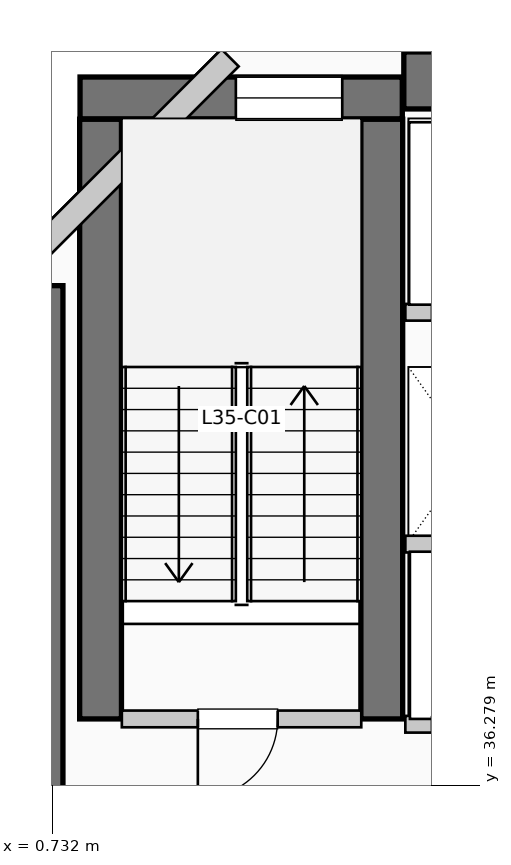
"""IFC4 building model, lengths in metres.
Left out: names, types, materials, properties, quantities, classifications, styles, units other than length and angle.
Written with IfcOpenShell. Run it as: python <this file> out.ifc"""

import sys

from ifc_helpers import new_model, si_unit, direction, frame, frame_2d, origin, place, context, subcontext, project, spatial, rectangle, extrude, element, fill, save


model = new_model("IFC4")
c1 = context("Model", 3, precision=1e-05, world=origin(), true_north=direction((0.0, 1.0)))
c2 = subcontext(c1, "Body", "Model", "MODEL_VIEW")
j1 = project(units=[si_unit("LENGTHUNIT", "METRE"), si_unit("PLANEANGLEUNIT", "RADIAN")], contexts=[c1])
p1 = place(None, origin())
s1 = spatial("IfcSite", under=j1, at=p1, CompositionType="ELEMENT")
p2 = place(p1, origin())
s2 = spatial("IfcBuilding", under=s1, at=p2, CompositionType="ELEMENT")
p3 = place(p2, frame((0.0, 0.0, 146.85)))
s3 = spatial("IfcBuildingStorey", under=s2, at=p3, CompositionType="ELEMENT", Elevation=146.85)
p4 = place(p3, frame((5.36, 45.55, 0.0), z_axis=(0.0, 0.0, 1.0), x_axis=(1.0, 0.0, 0.0)))
e1 = element("IfcWall", 1, at=p4, inside=s3, PredefinedType="SHEAR", context=c2, shape_type="SweptSolid", body=[
    extrude(rectangle(XDim=13.98, YDim=0.75, at=frame_2d((6.99, 0.0))), origin(), (0.0, 0.0, 1.0), 3.96),
])
p5 = place(p3, frame((0.5, 34.95, 0.0), z_axis=(0.0, 0.0, 1.0), x_axis=(0.0, 1.0, 0.0)))
e2 = element("IfcWall", 2, at=p5, inside=s3, PredefinedType="SHEAR", context=c2, shape_type="SweptSolid", body=[
    extrude(rectangle(XDim=7.9, YDim=0.75, at=frame_2d((3.95, 0.0))), origin(), (0.0, 0.0, 1.0), 3.96),
])
for number, where, z_axis, x_axis in (
    (3, (1.37, 37.15, 0.0), (0.0, 0.0, 1.0), (0.0, 1.0, 0.0)),
    (4, (5.07, 37.15, 0.0), (0.0, 0.0, 1.0), (0.0, 1.0, 0.0)),
):
    element("IfcWall", number, at=place(p3, frame(where, z_axis=z_axis, x_axis=x_axis)), inside=s3, PredefinedType="SHEAR", context=c2, shape_type="SweptSolid", body=[
        extrude(rectangle(XDim=7.89, YDim=0.55, at=frame_2d((3.945, 0.0))), origin(), (0.0, 0.0, 1.0), 3.96),
    ])
p6 = place(p3, frame((1.1, 45.32, 0.0), z_axis=(0.0, 0.0, 1.0), x_axis=(1.0, 0.0, 0.0)))
e5 = element("IfcWall", 5, at=p6, inside=s3, PredefinedType="SHEAR", context=c2, shape_type="SweptSolid", body=[
    extrude(rectangle(XDim=4.24, YDim=0.55, at=frame_2d((2.12, 0.0))), origin(), (0.0, 0.0, 1.0), 3.96),
])
p7 = place(p6, frame((2.05, 0.0, 1.05)))
e6 = element("IfcOpeningElement", 6, at=p7, cuts=e5, PredefinedType="OPENING", context=c2, shape_type="SweptSolid", body=[
    extrude(rectangle(XDim=1.4, YDim=1.8, at=frame_2d((0.7, 0.9))), frame((0.0, 0.285, 0.0), z_axis=(0.0, -1.0, 0.0), x_axis=(1.0, 0.0, 0.0)), (0.0, 0.0, 1.0), 0.57),
])
p8 = place(p3, frame((3.074, 45.848, 0.0), z_axis=(0.0, 0.0, 1.0), x_axis=(-0.707106781187, -0.707106781187, 0.0)))
e7 = element("IfcWall", 7, at=p8, inside=s3, PredefinedType="SOLIDWALL", context=c2, shape_type="SweptSolid", body=[
    extrude(rectangle(XDim=4.133, YDim=0.32, at=frame_2d((2.066, 0.0))), origin(), (0.0, 0.0, 1.0), 3.71),
])
p9 = place(p3, frame((1.65, 37.15, 0.0), z_axis=(0.0, 0.0, 1.0), x_axis=(1.0, 0.0, 0.0)))
e8 = element("IfcWall", 8, at=p9, inside=s3, PredefinedType="PARTITIONING", context=c2, shape_type="SweptSolid", body=[
    extrude(rectangle(XDim=3.15, YDim=0.22, at=frame_2d((1.575, 0.0))), origin(), (0.0, 0.0, 1.0), 3.71),
])
p10 = place(p9, frame((2.05, 0.0, 0.0), z_axis=(0.0, 0.0, 1.0), x_axis=(-1.0, 0.0, 0.0)))
e9 = element("IfcOpeningElement", 9, at=p10, cuts=e8, PredefinedType="OPENING", context=c2, shape_type="SweptSolid", body=[
    extrude(rectangle(XDim=1.05, YDim=2.15, at=frame_2d((0.525, 1.075))), frame((0.0, 0.12, 0.0), z_axis=(0.0, -1.0, 0.0), x_axis=(1.0, 0.0, 0.0)), (0.0, 0.0, 1.0), 0.24),
])
p11 = place(p3, frame((5.38, 37.08, 0.0), z_axis=(0.0, 0.0, 1.0), x_axis=(1.0, 0.0, 0.0)))
e10 = element("IfcWall", 10, at=p11, inside=s3, PredefinedType="PARTITIONING", context=c2, shape_type="SweptSolid", body=[
    extrude(rectangle(XDim=3.46, YDim=0.22, at=frame_2d((1.73, 0.0))), origin(), (0.0, 0.0, 1.0), 3.71),
])
p12 = place(p11, frame((1.55, 0.0, 0.0), z_axis=(0.0, 0.0, 1.0), x_axis=(-1.0, 0.0, 0.0)))
e11 = element("IfcOpeningElement", 11, at=p12, cuts=e10, PredefinedType="OPENING", context=c2, shape_type="SweptSolid", body=[
    extrude(rectangle(XDim=1.2, YDim=2.2, at=frame_2d((0.6, 1.1))), frame((0.0, 0.12, 0.0), z_axis=(0.0, -1.0, 0.0), x_axis=(1.0, 0.0, 0.0)), (0.0, 0.0, 1.0), 0.24),
])
p13 = place(p11, frame((3.22, 0.0, 0.0), z_axis=(0.0, 0.0, 1.0), x_axis=(-1.0, 0.0, 0.0)))
e12 = element("IfcOpeningElement", 12, at=p13, cuts=e10, PredefinedType="OPENING", context=c2, shape_type="SweptSolid", body=[
    extrude(rectangle(XDim=1.2, YDim=2.2, at=frame_2d((0.6, 1.1))), frame((0.0, 0.12, 0.0), z_axis=(0.0, -1.0, 0.0), x_axis=(1.0, 0.0, 0.0)), (0.0, 0.0, 1.0), 0.24),
])
p14 = place(p3, frame((5.38, 39.45, 0.0), z_axis=(0.0, 0.0, 1.0), x_axis=(1.0, 0.0, 0.0)))
e13 = element("IfcWall", 13, at=p14, inside=s3, PredefinedType="PARTITIONING", context=c2, shape_type="SweptSolid", body=[
    extrude(rectangle(XDim=3.46, YDim=0.22, at=frame_2d((1.73, 0.0))), origin(), (0.0, 0.0, 1.0), 3.71),
])
p15 = place(p3, frame((5.38, 42.5, 0.0), z_axis=(0.0, 0.0, 1.0), x_axis=(1.0, 0.0, 0.0)))
e14 = element("IfcWall", 14, at=p15, inside=s3, PredefinedType="PARTITIONING", context=c2, shape_type="SweptSolid", body=[
    extrude(rectangle(XDim=3.77, YDim=0.22, at=frame_2d((1.885, 0.0))), origin(), (0.0, 0.0, 1.0), 3.71),
])
p16 = place(p15, frame((1.75, 0.0, 0.0), z_axis=(0.0, 0.0, 1.0), x_axis=(-1.0, 0.0, 0.0)))
e15 = element("IfcOpeningElement", 15, at=p16, cuts=e14, PredefinedType="OPENING", context=c2, shape_type="SweptSolid", body=[
    extrude(rectangle(XDim=1.4, YDim=2.2, at=frame_2d((0.7, 1.1))), frame((0.0, 0.12, 0.0), z_axis=(0.0, -1.0, 0.0), x_axis=(1.0, 0.0, 0.0)), (0.0, 0.0, 1.0), 0.24),
])
p17 = place(p15, frame((3.53, 0.0, 0.0), z_axis=(0.0, 0.0, 1.0), x_axis=(-1.0, 0.0, 0.0)))
e16 = element("IfcOpeningElement", 16, at=p17, cuts=e14, PredefinedType="OPENING", context=c2, shape_type="SweptSolid", body=[
    extrude(rectangle(XDim=1.4, YDim=2.2, at=frame_2d((0.7, 1.1))), frame((0.0, 0.12, 0.0), z_axis=(0.0, -1.0, 0.0), x_axis=(1.0, 0.0, 0.0)), (0.0, 0.0, 1.0), 0.24),
])
p18 = place(p7, origin())
e17 = element("IfcWindow", 17, at=p18, inside=s3, PartitioningType="SINGLE_PANEL", PredefinedType="WINDOW", context=c2, shape_type="SweptSolid", body=[
    extrude(rectangle(XDim=1.4, YDim=1.8, at=frame_2d((0.7, 0.9))), frame((0.0, 0.03, 0.0), z_axis=(0.0, -1.0, 0.0), x_axis=(1.0, 0.0, 0.0)), (0.0, 0.0, 1.0), 0.06),
])
fill(e6, e17)
p19 = place(p10, origin())
e18 = element("IfcDoor", 18, at=p19, inside=s3, OperationType="SINGLE_SWING_LEFT", PredefinedType="DOOR", context=c2, shape_type="SweptSolid", body=[
    extrude(rectangle(XDim=1.05, YDim=2.15, at=frame_2d((0.525, 1.075))), frame((0.0, 0.025, 0.0), z_axis=(0.0, -1.0, 0.0), x_axis=(1.0, 0.0, 0.0)), (0.0, 0.0, 1.0), 0.05),
])
fill(e9, e18)
save(model, sys.argv[1])
